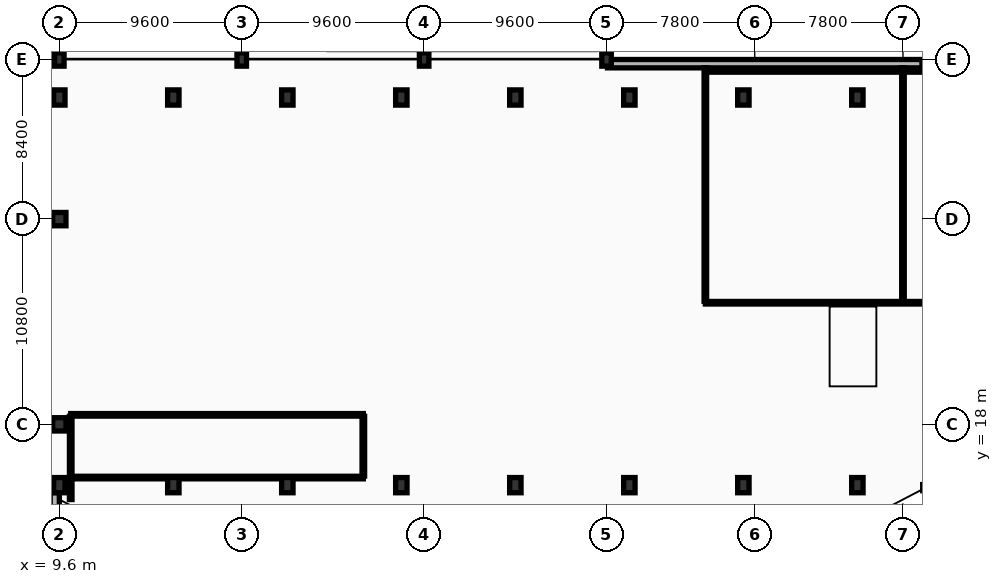
"""IFC4 building model, lengths in metres.
Left out: names, types, materials, properties, quantities, classifications, styles, units other than length and angle.
Written with IfcOpenShell. Run it as: python <this file> out.ifc"""

import sys

from ifc_helpers import new_model, si_unit, direction, frame, frame_2d, origin, origin_2d, place, context, subcontext, project, spatial, rectangle, extrude, element, fill, save


model = new_model("IFC4")
c1 = context("Model", 3, precision=1e-05, world=origin(), true_north=direction((0.0, 1.0)))
c2 = subcontext(c1, "Body", "Model", "MODEL_VIEW")
j1 = project(units=[si_unit("LENGTHUNIT", "METRE"), si_unit("PLANEANGLEUNIT", "RADIAN")], contexts=[c1])
p1 = place(None, origin())
s1 = spatial("IfcSite", under=j1, at=p1, CompositionType="ELEMENT")
p2 = place(p1, origin())
s2 = spatial("IfcBuilding", under=s1, at=p2, CompositionType="ELEMENT")
p3 = place(p2, origin())
s3 = spatial("IfcBuildingStorey", under=s2, at=p3, CompositionType="ELEMENT", Elevation=0.0)
for number, where, z_axis, x_axis in (
    (1, (9.6, 37.2, 0.0), (0.0, 0.0, 1.0), (1.0, 0.0, 0.0)),
    (2, (19.2, 37.2, 0.0), (0.0, 0.0, 1.0), (1.0, 0.0, 0.0)),
    (3, (28.8, 37.2, 0.0), (0.0, 0.0, 1.0), (1.0, 0.0, 0.0)),
    (4, (38.4, 37.2, 0.0), (0.0, 0.0, 1.0), (1.0, 0.0, 0.0)),
):
    element("IfcColumn", number, at=place(p3, frame(where, z_axis=z_axis, x_axis=x_axis)), inside=s3, PredefinedType="COLUMN", context=c2, shape_type="SweptSolid", body=[
        extrude(rectangle(XDim=0.5, YDim=0.7, at=origin_2d()), origin(), (0.0, 0.0, 1.0), 5.4),
    ])
for number, where, z_axis, x_axis in (
    (5, (9.6, 18.0, 0.0), (0.0, 0.0, 1.0), (1.0, 0.0, 0.0)),
    (6, (9.6, 28.8, 0.0), (0.0, 0.0, 1.0), (1.0, 0.0, 0.0)),
):
    element("IfcColumn", number, at=place(p3, frame(where, z_axis=z_axis, x_axis=x_axis)), inside=s3, PredefinedType="COLUMN", context=c2, shape_type="SweptSolid", body=[
        extrude(rectangle(XDim=0.7, YDim=0.7, at=origin_2d()), origin(), (0.0, 0.0, 1.0), 5.4),
    ])
for number, where, z_axis, x_axis in (
    (7, (9.6, 14.8, 0.0), (0.0, 0.0, 1.0), (1.0, 0.0, 0.0)),
    (8, (9.6, 35.2, 0.0), (0.0, 0.0, 1.0), (1.0, 0.0, 0.0)),
    (9, (15.6, 14.8, 0.0), (0.0, 0.0, 1.0), (1.0, 0.0, 0.0)),
    (10, (15.6, 35.2, 0.0), (0.0, 0.0, 1.0), (1.0, 0.0, 0.0)),
    (11, (21.6, 14.8, 0.0), (0.0, 0.0, 1.0), (1.0, 0.0, 0.0)),
    (12, (21.6, 35.2, 0.0), (0.0, 0.0, 1.0), (1.0, 0.0, 0.0)),
    (13, (27.6, 14.8, 0.0), (0.0, 0.0, 1.0), (1.0, 0.0, 0.0)),
    (14, (27.6, 35.2, 0.0), (0.0, 0.0, 1.0), (1.0, 0.0, 0.0)),
    (15, (33.6, 14.8, 0.0), (0.0, 0.0, 1.0), (1.0, 0.0, 0.0)),
    (16, (33.6, 35.2, 0.0), (0.0, 0.0, 1.0), (1.0, 0.0, 0.0)),
    (17, (39.6, 14.8, 0.0), (0.0, 0.0, 1.0), (1.0, 0.0, 0.0)),
    (18, (39.6, 35.2, 0.0), (0.0, 0.0, 1.0), (1.0, 0.0, 0.0)),
    (19, (45.6, 14.8, 0.0), (0.0, 0.0, 1.0), (1.0, 0.0, 0.0)),
    (20, (45.6, 35.2, 0.0), (0.0, 0.0, 1.0), (1.0, 0.0, 0.0)),
    (21, (51.6, 14.8, 0.0), (0.0, 0.0, 1.0), (1.0, 0.0, 0.0)),
    (22, (51.6, 35.2, 0.0), (0.0, 0.0, 1.0), (1.0, 0.0, 0.0)),
):
    element("IfcColumn", number, at=place(p3, frame(where, z_axis=z_axis, x_axis=x_axis)), inside=s3, PredefinedType="COLUMN", context=c2, shape_type="SweptSolid", body=[
        extrude(rectangle(XDim=0.6, YDim=0.8, at=origin_2d()), origin(), (0.0, 0.0, 1.0), 5.4),
    ])
p4 = place(p3, frame((9.36, 14.408, 0.0), z_axis=(0.0, 0.0, 1.0), x_axis=(0.0, -1.0, 0.0)))
e23 = element("IfcWall", 23, at=p4, inside=s3, PredefinedType="STANDARD", context=c2, shape_type="SweptSolid", body=[
    extrude(rectangle(XDim=5.666, YDim=0.48, at=frame_2d((2.833, 0.0))), origin(), (0.0, 0.0, 1.0), 4.33),
])
p5 = place(p4, frame((2.008, 0.0, 0.85)))
e24 = element("IfcOpeningElement", 24, at=p5, cuts=e23, PredefinedType="OPENING", context=c2, shape_type="SweptSolid", body=[
    extrude(rectangle(XDim=1.6, YDim=2.25, at=frame_2d((0.8, 1.125))), frame((0.0, 0.25, 0.0), z_axis=(0.0, -1.0, 0.0), x_axis=(1.0, 0.0, 0.0)), (0.0, 0.0, 1.0), 0.5),
])
p6 = place(p3, frame((38.45, 36.98, 0.0), z_axis=(0.0, 0.0, 1.0), x_axis=(1.0, 0.0, 0.0)))
e25 = element("IfcWall", 25, at=p6, inside=s3, PredefinedType="STANDARD", context=c2, shape_type="SweptSolid", body=[
    extrude(rectangle(XDim=16.55, YDim=0.44, at=frame_2d((8.275, 0.0))), origin(), (0.0, 0.0, 1.0), 4.28),
])
for number, where, z_axis, x_axis in (
    (26, (43.6, 36.6, 0.0), (0.0, 0.0, 1.0), (1.0, 0.0, 0.0)),
    (27, (54.89, 24.4, 0.0), (0.0, 0.0, 1.0), (-1.0, 0.0, 0.0)),
):
    element("IfcWall", number, at=place(p3, frame(where, z_axis=z_axis, x_axis=x_axis)), inside=s3, PredefinedType="PARTITIONING", context=c2, shape_type="SweptSolid", body=[
        extrude(rectangle(XDim=11.29, YDim=0.135, at=frame_2d((5.645, 0.0))), origin(), (0.0, 0.0, 1.0), 5.125),
    ])
p7 = place(p3, frame((43.6, 24.478, 0.0), z_axis=(0.0, 0.0, 1.0), x_axis=(0.0, 1.0, 0.0)))
e28 = element("IfcWall", 28, at=p7, inside=s3, PredefinedType="PARTITIONING", context=c2, shape_type="SweptSolid", body=[
    extrude(rectangle(XDim=12.289, YDim=0.135, at=frame_2d((6.144, 0.0))), origin(), (0.0, 0.0, 1.0), 4.47),
])
p8 = place(p7, frame((1.946, 0.0, 0.0)))
e29 = element("IfcOpeningElement", 29, at=p8, cuts=e28, PredefinedType="OPENING", context=c2, shape_type="SweptSolid", body=[
    extrude(rectangle(XDim=0.95, YDim=2.15, at=frame_2d((0.475, 1.075))), frame((0.0, 0.077, 0.0), z_axis=(0.0, -1.0, 0.0), x_axis=(1.0, 0.0, 0.0)), (0.0, 0.0, 1.0), 0.155),
])
p9 = place(p3, frame((54.0, 36.766, 0.0), z_axis=(0.0, 0.0, 1.0), x_axis=(0.0, -1.0, 0.0)))
e30 = element("IfcWall", 30, at=p9, inside=s3, PredefinedType="PARTITIONING", context=c2, shape_type="SweptSolid", body=[
    extrude(rectangle(XDim=12.289, YDim=0.135, at=frame_2d((6.144, 0.0))), origin(), (0.0, 0.0, 1.0), 5.125),
])
p10 = place(p3, frame((10.2, 18.5, 0.0), z_axis=(0.0, 0.0, 1.0), x_axis=(1.0, 0.0, 0.0)))
e31 = element("IfcWall", 31, at=p10, inside=s3, PredefinedType="PARTITIONING", context=c2, shape_type="SweptSolid", body=[
    extrude(rectangle(XDim=15.4, YDim=0.135, at=frame_2d((7.7, 0.0))), origin(), (0.0, 0.0, 1.0), 5.125),
])
p11 = place(p10, frame((2.413, 0.0, 0.0)))
e32 = element("IfcOpeningElement", 32, at=p11, cuts=e31, PredefinedType="OPENING", context=c2, shape_type="SweptSolid", body=[
    extrude(rectangle(XDim=0.95, YDim=2.15, at=frame_2d((0.475, 1.075))), frame((0.0, 0.077, 0.0), z_axis=(0.0, -1.0, 0.0), x_axis=(1.0, 0.0, 0.0)), (0.0, 0.0, 1.0), 0.155),
])
p12 = place(p3, frame((25.6, 15.2, 0.0), z_axis=(0.0, 0.0, 1.0), x_axis=(-1.0, 0.0, 0.0)))
e33 = element("IfcWall", 33, at=p12, inside=s3, PredefinedType="PARTITIONING", context=c2, shape_type="SweptSolid", body=[
    extrude(rectangle(XDim=15.4, YDim=0.135, at=frame_2d((7.7, 0.0))), origin(), (0.0, 0.0, 1.0), 4.43),
])
p13 = place(p3, frame((10.2, 14.043, 0.0), z_axis=(0.0, 0.0, 1.0), x_axis=(0.0, 1.0, 0.0)))
e34 = element("IfcWall", 34, at=p13, inside=s3, PredefinedType="PARTITIONING", context=c2, shape_type="SweptSolid", body=[
    extrude(rectangle(XDim=4.38, YDim=0.135, at=frame_2d((2.19, 0.0))), origin(), (0.0, 0.0, 1.0), 4.43),
])
p14 = place(p3, frame((25.6, 18.423, 0.0), z_axis=(0.0, 0.0, 1.0), x_axis=(0.0, -1.0, 0.0)))
e35 = element("IfcWall", 35, at=p14, inside=s3, PredefinedType="PARTITIONING", context=c2, shape_type="SweptSolid", body=[
    extrude(rectangle(XDim=3.145, YDim=0.135, at=frame_2d((1.573, 0.0))), origin(), (0.0, 0.0, 1.0), 5.125),
])
p15 = place(p8, origin())
e36 = element("IfcDoor", 36, at=p15, inside=s3, OperationType="SINGLE_SWING_RIGHT", PredefinedType="DOOR", context=c2, shape_type="SweptSolid", body=[
    extrude(rectangle(XDim=0.95, YDim=2.15, at=frame_2d((0.475, 1.075))), frame((0.0, 0.025, 0.0), z_axis=(0.0, -1.0, 0.0), x_axis=(1.0, 0.0, 0.0)), (0.0, 0.0, 1.0), 0.05),
])
fill(e29, e36)
p16 = place(p11, origin())
e37 = element("IfcDoor", 37, at=p16, inside=s3, OperationType="SINGLE_SWING_RIGHT", PredefinedType="DOOR", context=c2, shape_type="SweptSolid", body=[
    extrude(rectangle(XDim=0.95, YDim=2.15, at=frame_2d((0.475, 1.075))), frame((0.0, 0.025, 0.0), z_axis=(0.0, -1.0, 0.0), x_axis=(1.0, 0.0, 0.0)), (0.0, 0.0, 1.0), 0.05),
])
fill(e32, e37)
save(model, sys.argv[1])
